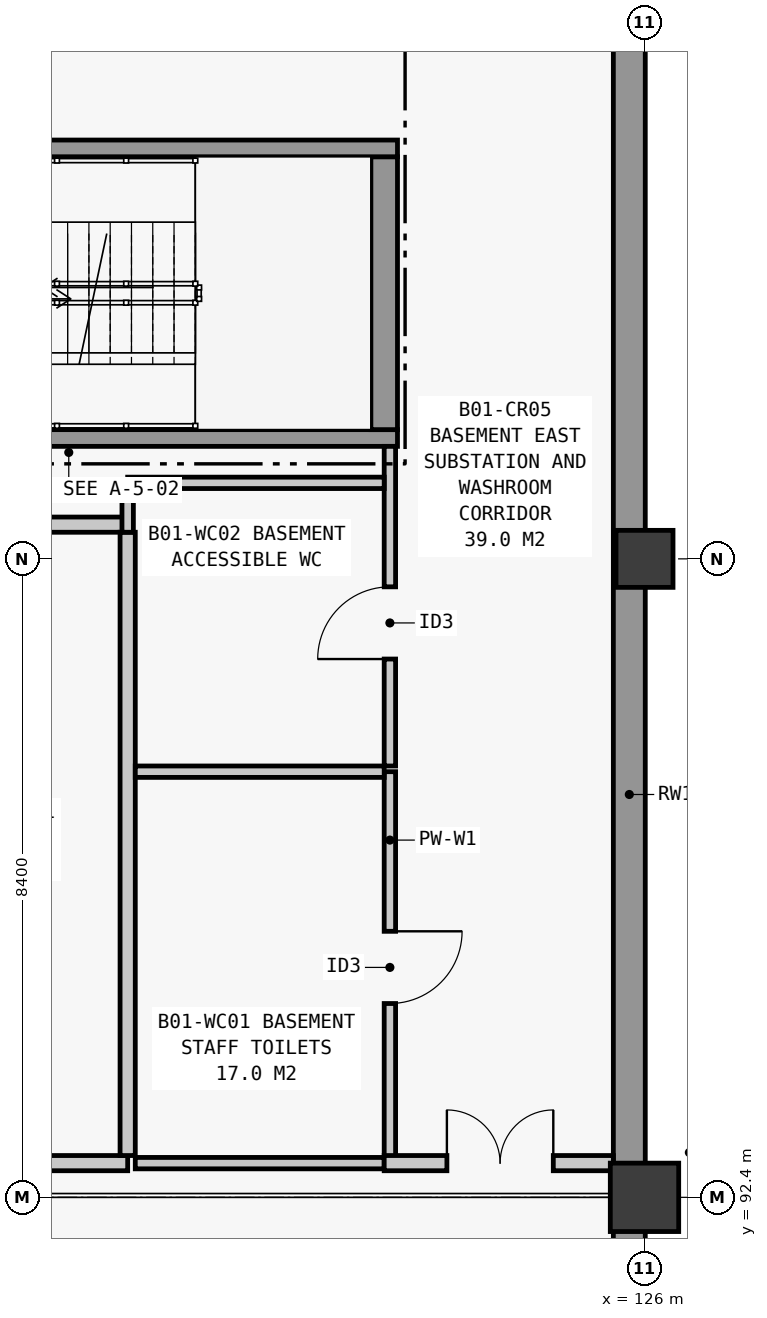
"""IFC4 building model, lengths in metres.
Left out: names, types, materials, properties, quantities, classifications, styles, units other than length and angle.
Written with IfcOpenShell. Run it as: python <this file> out.ifc"""

import sys

from ifc_helpers import new_model, si_unit, direction, frame, frame_2d, origin, origin_2d, place, context, subcontext, project, spatial, rectangle, extrude, element, fill, save


model = new_model("IFC4")
c1 = context("Model", 3, precision=1e-05, world=origin(), true_north=direction((0.0, 1.0)))
c2 = subcontext(c1, "Body", "Model", "MODEL_VIEW")
j1 = project(units=[si_unit("LENGTHUNIT", "METRE"), si_unit("PLANEANGLEUNIT", "RADIAN")], contexts=[c1])
p1 = place(None, origin())
s1 = spatial("IfcSite", under=j1, at=p1, CompositionType="ELEMENT")
p2 = place(p1, origin())
s2 = spatial("IfcBuilding", under=s1, at=p2, CompositionType="ELEMENT")
p3 = place(p2, frame((0.0, 0.0, -4.8)))
s3 = spatial("IfcBuildingStorey", under=s2, at=p3, CompositionType="ELEMENT", Elevation=-4.8)
p4 = place(p3, frame((126.0, 92.4, 0.0), z_axis=(0.0, 0.0, 1.0), x_axis=(1.0, 0.0, 0.0)))
e1 = element("IfcColumn", 1, at=p4, inside=s3, PredefinedType="COLUMN", context=c2, shape_type="SweptSolid", body=[
    extrude(rectangle(XDim=0.9, YDim=0.9, at=origin_2d()), origin(), (0.0, 0.0, 1.0), 4.8),
])
p5 = place(p3, frame((126.0, 100.8, 0.0), z_axis=(0.0, 0.0, 1.0), x_axis=(1.0, 0.0, 0.0)))
e2 = element("IfcColumn", 2, at=p5, inside=s3, PredefinedType="COLUMN", context=c2, shape_type="SweptSolid", body=[
    extrude(rectangle(XDim=0.75, YDim=0.75, at=origin_2d()), origin(), (0.0, 0.0, 1.0), 4.8),
])
p6 = place(p3, frame((125.8, 25.4, 0.0), z_axis=(0.0, 0.0, 1.0), x_axis=(0.0, 1.0, 0.0)))
e3 = element("IfcWall", 3, at=p6, inside=s3, PredefinedType="USERDEFINED", context=c2, shape_type="SweptSolid", body=[
    extrude(rectangle(XDim=92.0, YDim=0.42, at=frame_2d((46.0, 0.0))), origin(), (0.0, 0.0, 1.0), 4.5),
])
p7 = place(p3, frame((113.98, 102.39, 0.0), z_axis=(0.0, 0.0, 1.0), x_axis=(1.0, 0.0, 0.0)))
e4 = element("IfcWall", 4, at=p7, inside=s3, PredefinedType="SOLIDWALL", context=c2, shape_type="SweptSolid", body=[
    extrude(rectangle(XDim=8.77, YDim=0.22, at=frame_2d((4.385, 0.0))), origin(), (0.0, 0.0, 1.0), 4.5),
])
p8 = place(p3, frame((122.575, 102.5, 0.0), z_axis=(0.0, 0.0, 1.0), x_axis=(0.0, 1.0, 0.0)))
e5 = element("IfcWall", 5, at=p8, inside=s3, PredefinedType="SHEAR", context=c2, shape_type="SweptSolid", body=[
    extrude(rectangle(XDim=3.59, YDim=0.35, at=frame_2d((1.795, 0.0))), origin(), (0.0, 0.0, 1.0), 4.5),
])
p9 = place(p3, frame((122.75, 106.2, 0.0), z_axis=(0.0, 0.0, 1.0), x_axis=(-1.0, 0.0, 0.0)))
e6 = element("IfcWall", 6, at=p9, inside=s3, PredefinedType="SOLIDWALL", context=c2, shape_type="SweptSolid", body=[
    extrude(rectangle(XDim=8.77, YDim=0.22, at=frame_2d((4.385, 0.0))), origin(), (0.0, 0.0, 1.0), 4.5),
])
p10 = place(p3, frame((99.8, 101.25, 0.0), z_axis=(0.0, 0.0, 1.0), x_axis=(1.0, 0.0, 0.0)))
e7 = element("IfcWall", 7, at=p10, inside=s3, PredefinedType="PARTITIONING", context=c2, shape_type="SweptSolid", body=[
    extrude(rectangle(XDim=19.4, YDim=0.2, at=frame_2d((9.7, 0.0))), origin(), (0.0, 0.0, 1.0), 3.75),
])
p11 = place(p10, frame((9.197, 0.0, 0.0)))
e8 = element("IfcOpeningElement", 8, at=p11, cuts=e7, PredefinedType="OPENING", context=c2, shape_type="SweptSolid", body=[
    extrude(rectangle(XDim=1.4, YDim=2.2, at=frame_2d((0.7, 1.1))), frame((0.0, 0.115, 0.0), z_axis=(0.0, -1.0, 0.0), x_axis=(1.0, 0.0, 0.0)), (0.0, 0.0, 1.0), 0.23),
])
p12 = place(p3, frame((99.8, 92.85, 0.0), z_axis=(0.0, 0.0, 1.0), x_axis=(1.0, 0.0, 0.0)))
e9 = element("IfcWall", 9, at=p12, inside=s3, PredefinedType="PARTITIONING", context=c2, shape_type="SweptSolid", body=[
    extrude(rectangle(XDim=19.4, YDim=0.2, at=frame_2d((9.7, 0.0))), origin(), (0.0, 0.0, 1.0), 3.75),
])
p13 = place(p3, frame((119.2, 92.95, 0.0), z_axis=(0.0, 0.0, 1.0), x_axis=(0.0, 1.0, 0.0)))
e10 = element("IfcWall", 10, at=p13, inside=s3, PredefinedType="PARTITIONING", context=c2, shape_type="SweptSolid", body=[
    extrude(rectangle(XDim=8.2, YDim=0.2, at=frame_2d((4.1, 0.0))), origin(), (0.0, 0.0, 1.0), 3.55),
])
p14 = place(p3, frame((122.65, 92.85, 0.0), z_axis=(0.0, 0.0, 1.0), x_axis=(0.0, 1.0, 0.0)))
e11 = element("IfcWall", 11, at=p14, inside=s3, PredefinedType="PLUMBINGWALL", context=c2, shape_type="SweptSolid", body=[
    extrude(rectangle(XDim=5.15, YDim=0.15, at=frame_2d((2.575, 0.0))), origin(), (0.0, 0.0, 1.0), 4.5),
])
p15 = place(p14, frame((2.1, 0.0, 0.0)))
e12 = element("IfcOpeningElement", 12, at=p15, cuts=e11, PredefinedType="OPENING", context=c2, shape_type="SweptSolid", body=[
    extrude(rectangle(XDim=0.95, YDim=2.1, at=frame_2d((0.475, 1.05))), frame((0.0, 0.09, 0.0), z_axis=(0.0, -1.0, 0.0), x_axis=(1.0, 0.0, 0.0)), (0.0, 0.0, 1.0), 0.18),
])
for number, where, z_axis, x_axis in (
    (13, (119.3, 92.85, 0.0), (0.0, 0.0, 1.0), (1.0, 0.0, 0.0)),
    (14, (119.3, 98.0, 0.0), (0.0, 0.0, 1.0), (1.0, 0.0, 0.0)),
):
    element("IfcWall", number, at=place(p3, frame(where, z_axis=z_axis, x_axis=x_axis)), inside=s3, PredefinedType="PLUMBINGWALL", context=c2, shape_type="SweptSolid", body=[
        extrude(rectangle(XDim=3.275, YDim=0.15, at=frame_2d((1.637, 0.0))), origin(), (0.0, 0.0, 1.0), 4.5),
    ])
p16 = place(p3, frame((122.65, 98.075, 0.0), z_axis=(0.0, 0.0, 1.0), x_axis=(0.0, 1.0, 0.0)))
e15 = element("IfcWall", 15, at=p16, inside=s3, PredefinedType="PLUMBINGWALL", context=c2, shape_type="SweptSolid", body=[
    extrude(rectangle(XDim=4.205, YDim=0.15, at=frame_2d((2.103, 0.0))), origin(), (0.0, 0.0, 1.0), 3.55),
])
p17 = place(p16, frame((1.407, 0.0, 0.0)))
e16 = element("IfcOpeningElement", 16, at=p17, cuts=e15, PredefinedType="OPENING", context=c2, shape_type="SweptSolid", body=[
    extrude(rectangle(XDim=0.95, YDim=2.1, at=frame_2d((0.475, 1.05))), frame((0.0, 0.09, 0.0), z_axis=(0.0, -1.0, 0.0), x_axis=(1.0, 0.0, 0.0)), (0.0, 0.0, 1.0), 0.18),
])
p18 = place(p3, frame((119.2, 101.8, 0.0), z_axis=(0.0, 0.0, 1.0), x_axis=(1.0, 0.0, 0.0)))
e17 = element("IfcWall", 17, at=p18, inside=s3, PredefinedType="PLUMBINGWALL", context=c2, shape_type="SweptSolid", body=[
    extrude(rectangle(XDim=3.375, YDim=0.15, at=frame_2d((1.688, 0.0))), origin(), (0.0, 0.0, 1.0), 4.5),
])
p19 = place(p3, frame((119.2, 101.15, 0.0), z_axis=(0.0, 0.0, 1.0), x_axis=(0.0, 1.0, 0.0)))
e18 = element("IfcWall", 18, at=p19, inside=s3, PredefinedType="PLUMBINGWALL", context=c2, shape_type="SweptSolid", body=[
    extrude(rectangle(XDim=0.575, YDim=0.15, at=frame_2d((0.288, 0.0))), origin(), (0.0, 0.0, 1.0), 4.5),
])
p20 = place(p3, frame((122.575, 92.85, 0.0), z_axis=(0.0, 0.0, 1.0), x_axis=(1.0, 0.0, 0.0)))
e19 = element("IfcWall", 19, at=p20, inside=s3, PredefinedType="PARTITIONING", context=c2, shape_type="SweptSolid", body=[
    extrude(rectangle(XDim=3.015, YDim=0.2, at=frame_2d((1.508, 0.0))), origin(), (0.0, 0.0, 1.0), 4.5),
])
p21 = place(p20, frame((0.825, 0.0, 0.0)))
e20 = element("IfcOpeningElement", 20, at=p21, cuts=e19, PredefinedType="OPENING", context=c2, shape_type="SweptSolid", body=[
    extrude(rectangle(XDim=1.4, YDim=2.2, at=frame_2d((0.7, 1.1))), frame((0.0, 0.115, 0.0), z_axis=(0.0, -1.0, 0.0), x_axis=(1.0, 0.0, 0.0)), (0.0, 0.0, 1.0), 0.23),
])
p22 = place(p15, frame((0.95, 0.0, 0.0), z_axis=(0.0, 0.0, 1.0), x_axis=(-1.0, 0.0, 0.0)))
e21 = element("IfcDoor", 21, at=p22, inside=s3, OperationType="SINGLE_SWING_RIGHT", PredefinedType="DOOR", context=c2, shape_type="SweptSolid", body=[
    extrude(rectangle(XDim=0.95, YDim=2.1, at=frame_2d((0.475, 1.05))), frame((0.0, 0.025, 0.0), z_axis=(0.0, -1.0, 0.0), x_axis=(1.0, 0.0, 0.0)), (0.0, 0.0, 1.0), 0.05),
])
fill(e12, e21)
p23 = place(p17, origin())
e22 = element("IfcDoor", 22, at=p23, inside=s3, OperationType="SINGLE_SWING_LEFT", PredefinedType="DOOR", context=c2, shape_type="SweptSolid", body=[
    extrude(rectangle(XDim=0.95, YDim=2.1, at=frame_2d((0.475, 1.05))), frame((0.0, 0.025, 0.0), z_axis=(0.0, -1.0, 0.0), x_axis=(1.0, 0.0, 0.0)), (0.0, 0.0, 1.0), 0.05),
])
fill(e16, e22)
p24 = place(p21, origin())
e23 = element("IfcDoor", 23, at=p24, inside=s3, OperationType="DOUBLE_DOOR_SINGLE_SWING", PredefinedType="DOOR", context=c2, shape_type="SweptSolid", body=[
    extrude(rectangle(XDim=1.4, YDim=2.2, at=frame_2d((0.7, 1.1))), frame((0.0, 0.025, 0.0), z_axis=(0.0, -1.0, 0.0), x_axis=(1.0, 0.0, 0.0)), (0.0, 0.0, 1.0), 0.05),
])
fill(e20, e23)
save(model, sys.argv[1])
